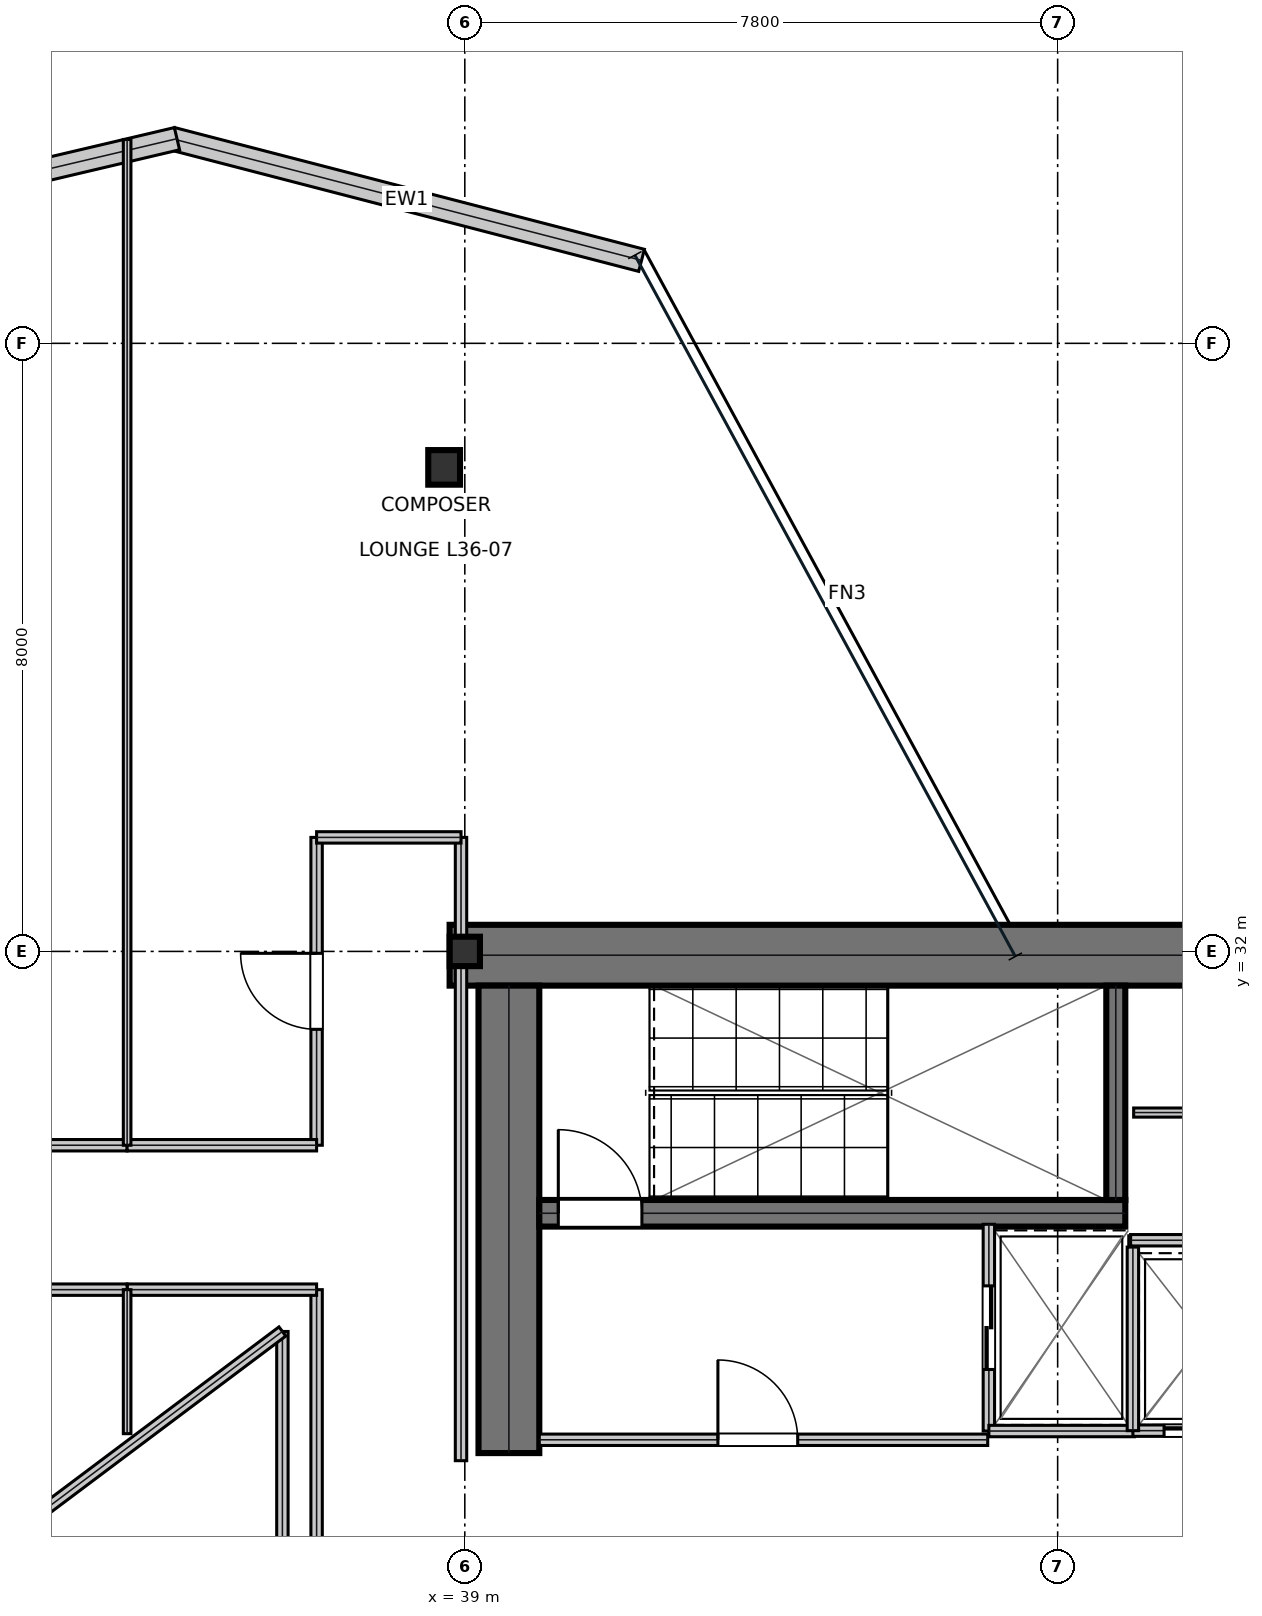
"""IFC4 building model, lengths in metres.
Left out: names, types, materials, properties, quantities, classifications, styles, units other than length and angle.
Written with IfcOpenShell. Run it as: python <this file> out.ifc"""

import sys

from ifc_helpers import new_model, si_unit, direction, frame, frame_2d, origin, origin_2d, place, context, subcontext, project, spatial, rectangle, i_section, extrude, element, fill, save


model = new_model("IFC4")
c1 = context("Model", 3, precision=1e-05, world=origin(), true_north=direction((0.0, 1.0)))
c2 = subcontext(c1, "Body", "Model", "MODEL_VIEW")
j1 = project(units=[si_unit("LENGTHUNIT", "METRE"), si_unit("PLANEANGLEUNIT", "RADIAN")], contexts=[c1])
p1 = place(None, origin())
s1 = spatial("IfcSite", under=j1, at=p1, CompositionType="ELEMENT")
p2 = place(p1, origin())
s2 = spatial("IfcBuilding", under=s1, at=p2, CompositionType="ELEMENT")
p3 = place(p2, frame((0.0, 0.0, 157.35)))
s3 = spatial("IfcBuildingStorey", under=s2, at=p3, CompositionType="ELEMENT", Elevation=157.35)
p4 = place(p3, frame((38.8, 31.95, 0.0), z_axis=(0.0, 0.0, 1.0), x_axis=(1.0, 0.0, 0.0)))
e1 = element("IfcWall", 1, at=p4, inside=s3, PredefinedType="SHEAR", context=c2, shape_type="SweptSolid", body=[
    extrude(rectangle(XDim=16.0, YDim=0.8, at=frame_2d((8.0, 0.0))), origin(), (0.0, 0.0, 1.0), 3.81),
])
p5 = place(p3, frame((39.58, 25.4, 0.0), z_axis=(0.0, 0.0, 1.0), x_axis=(0.0, 1.0, 0.0)))
e2 = element("IfcWall", 2, at=p5, inside=s3, PredefinedType="SHEAR", context=c2, shape_type="SweptSolid", body=[
    extrude(rectangle(XDim=6.15, YDim=0.8, at=frame_2d((3.075, 0.0))), origin(), (0.0, 0.0, 1.0), 3.81),
])
p6 = place(p3, frame((39.98, 28.555, 0.0), z_axis=(0.0, 0.0, 1.0), x_axis=(1.0, 0.0, 0.0)))
e3 = element("IfcWall", 3, at=p6, inside=s3, PredefinedType="SHEAR", context=c2, shape_type="SweptSolid", body=[
    extrude(rectangle(XDim=7.71, YDim=0.35, at=frame_2d((3.855, 0.0))), origin(), (0.0, 0.0, 1.0), 3.81),
])
p7 = place(p6, frame((0.25, 0.0, 0.0)))
e4 = element("IfcOpeningElement", 4, at=p7, cuts=e3, PredefinedType="OPENING", context=c2, shape_type="SweptSolid", body=[
    extrude(rectangle(XDim=1.1, YDim=2.15, at=frame_2d((0.55, 1.075))), frame((0.0, 0.185, 0.0), z_axis=(0.0, -1.0, 0.0), x_axis=(1.0, 0.0, 0.0)), (0.0, 0.0, 1.0), 0.37),
])
p8 = place(p3, frame((47.565, 28.73, 0.0), z_axis=(0.0, 0.0, 1.0), x_axis=(0.0, 1.0, 0.0)))
e5 = element("IfcWall", 5, at=p8, inside=s3, PredefinedType="SHEAR", context=c2, shape_type="SweptSolid", body=[
    extrude(rectangle(XDim=2.82, YDim=0.25, at=frame_2d((1.41, 0.0))), origin(), (0.0, 0.0, 1.0), 3.81),
])
p9 = place(p3, frame((39.0, 32.0, 0.0), z_axis=(0.0, 0.0, 1.0), x_axis=(1.0, 0.0, 0.0)))
e6 = element("IfcColumn", 6, at=p9, inside=s3, PredefinedType="COLUMN", context=c2, shape_type="SweptSolid", body=[
    extrude(i_section(OverallWidth=0.398, OverallDepth=0.387, WebThickness=0.021, FlangeThickness=0.033, at=origin_2d()), origin(), (0.0, 0.0, 1.0), 4.044),
])
p10 = place(p3, frame((38.728, 38.368, 0.016), z_axis=(-0.004494627579, -0.026846289054, 0.999629468897), x_axis=(0.986273042842, -0.165122636132, 0.0)))
e7 = element("IfcColumn", 7, at=p10, inside=s3, PredefinedType="COLUMN", context=c2, shape_type="SweptSolid", body=[
    extrude(i_section(OverallWidth=0.418, OverallDepth=0.455, WebThickness=0.042, FlangeThickness=0.068, at=origin_2d()), origin(), (0.0, 0.0, 1.0), 4.02),
])
p11 = place(p3, frame((41.325, 41.092, 0.0), z_axis=(0.0, 0.0, 1.0), x_axis=(-0.96801891639, 0.250877216005, 0.0)))
e8 = element("IfcWall", 8, at=p11, inside=s3, PredefinedType="STANDARD", context=c2, shape_type="SweptSolid", body=[
    extrude(rectangle(XDim=6.384, YDim=0.3, at=frame_2d((3.192, 0.0))), origin(), (0.0, 0.0, 1.0), 3.81),
])
p12 = place(p3, frame((35.213, 42.692, 0.0), z_axis=(0.0, 0.0, 1.0), x_axis=(-0.973355101444, -0.229302957882, 0.0)))
e9 = element("IfcWall", 9, at=p12, inside=s3, PredefinedType="STANDARD", context=c2, shape_type="SweptSolid", body=[
    extrude(rectangle(XDim=6.349, YDim=0.3, at=frame_2d((3.174, 0.0))), origin(), (0.0, 0.0, 1.0), 3.81),
])
p13 = place(p3, frame((39.98, 25.575, 0.0), z_axis=(0.0, 0.0, 1.0), x_axis=(1.0, 0.0, 0.0)))
e10 = element("IfcWall", 10, at=p13, inside=s3, PredefinedType="PARTITIONING", context=c2, shape_type="SweptSolid", body=[
    extrude(rectangle(XDim=5.9, YDim=0.15, at=frame_2d((2.95, 0.0))), origin(), (0.0, 0.0, 1.0), 3.81),
])
p14 = place(p13, frame((2.35, 0.0, 0.0)))
e11 = element("IfcOpeningElement", 11, at=p14, cuts=e10, PredefinedType="OPENING", context=c2, shape_type="SweptSolid", body=[
    extrude(rectangle(XDim=1.05, YDim=2.15, at=frame_2d((0.525, 1.075))), frame((0.0, 0.085, 0.0), z_axis=(0.0, -1.0, 0.0), x_axis=(1.0, 0.0, 0.0)), (0.0, 0.0, 1.0), 0.17),
])
p15 = place(p3, frame((45.895, 25.69, 0.0), z_axis=(0.0, 0.0, 1.0), x_axis=(0.0, 1.0, 0.0)))
e12 = element("IfcWall", 12, at=p15, inside=s3, PredefinedType="PARTITIONING", context=c2, shape_type="SweptSolid", body=[
    extrude(rectangle(XDim=2.72, YDim=0.15, at=frame_2d((1.36, 0.0))), origin(), (0.0, 0.0, 1.0), 3.81),
])
p16 = place(p15, frame((0.81, 0.0, 0.0)))
e13 = element("IfcOpeningElement", 13, at=p16, cuts=e12, PredefinedType="OPENING", context=c2, shape_type="SweptSolid", body=[
    extrude(rectangle(XDim=1.1, YDim=2.15, at=frame_2d((0.55, 1.075))), frame((0.0, 0.085, 0.0), z_axis=(0.0, -1.0, 0.0), x_axis=(1.0, 0.0, 0.0)), (0.0, 0.0, 1.0), 0.17),
])
p17 = place(p3, frame((45.895, 25.69, 0.0), z_axis=(0.0, 0.0, 1.0), x_axis=(1.0, 0.0, 0.0)))
e14 = element("IfcWall", 14, at=p17, inside=s3, PredefinedType="PARTITIONING", context=c2, shape_type="SweptSolid", body=[
    extrude(rectangle(XDim=1.915, YDim=0.15, at=frame_2d((0.958, 0.0))), origin(), (0.0, 0.0, 1.0), 3.81),
])
p18 = place(p3, frame((47.79, 25.695, 0.0), z_axis=(0.0, 0.0, 1.0), x_axis=(1.0, 0.0, 0.0)))
e15 = element("IfcWall", 15, at=p18, inside=s3, PredefinedType="PARTITIONING", context=c2, shape_type="SweptSolid", body=[
    extrude(rectangle(XDim=1.92, YDim=0.15, at=frame_2d((0.96, 0.0))), origin(), (0.0, 0.0, 1.0), 3.81),
])
p19 = place(p18, frame((0.41, 0.0, 0.0)))
e16 = element("IfcOpeningElement", 16, at=p19, cuts=e15, PredefinedType="OPENING", context=c2, shape_type="SweptSolid", body=[
    extrude(rectangle(XDim=1.1, YDim=2.15, at=frame_2d((0.55, 1.075))), frame((0.0, 0.085, 0.0), z_axis=(0.0, -1.0, 0.0), x_axis=(1.0, 0.0, 0.0)), (0.0, 0.0, 1.0), 0.17),
])
p20 = place(p3, frame((47.79, 25.695, 0.0), z_axis=(0.0, 0.0, 1.0), x_axis=(0.0, 1.0, 0.0)))
e17 = element("IfcWall", 17, at=p20, inside=s3, PredefinedType="PARTITIONING", context=c2, shape_type="SweptSolid", body=[
    extrude(rectangle(XDim=2.415, YDim=0.15, at=frame_2d((1.208, 0.0))), origin(), (0.0, 0.0, 1.0), 3.81),
])
p21 = place(p3, frame((47.76, 28.2, 0.0), z_axis=(0.0, 0.0, 1.0), x_axis=(1.0, 0.0, 0.0)))
e18 = element("IfcWall", 18, at=p21, inside=s3, PredefinedType="PARTITIONING", context=c2, shape_type="SweptSolid", body=[
    extrude(rectangle(XDim=1.99, YDim=0.15, at=frame_2d((0.995, 0.0))), origin(), (0.0, 0.0, 1.0), 3.81),
])
p22 = place(p3, frame((47.8, 29.88, 0.0), z_axis=(0.0, 0.0, 1.0), x_axis=(1.0, 0.0, 0.0)))
e19 = element("IfcWall", 19, at=p22, inside=s3, PredefinedType="PARTITIONING", context=c2, shape_type="SweptSolid", body=[
    extrude(rectangle(XDim=5.86, YDim=0.12, at=frame_2d((2.93, 0.0))), origin(), (0.0, 0.0, 1.0), 3.81),
])
p23 = place(p22, frame((2.5, 0.0, 0.0)))
e20 = element("IfcOpeningElement", 20, at=p23, cuts=e19, PredefinedType="OPENING", context=c2, shape_type="SweptSolid", body=[
    extrude(rectangle(XDim=0.85, YDim=2.15, at=frame_2d((0.425, 1.075))), frame((0.0, 0.07, 0.0), z_axis=(0.0, -1.0, 0.0), x_axis=(1.0, 0.0, 0.0)), (0.0, 0.0, 1.0), 0.14),
])
p24 = place(p3, frame((37.05, 14.5, 0.0), z_axis=(0.0, 0.0, 1.0), x_axis=(0.0, 1.0, 0.0)))
e21 = element("IfcWall", 21, at=p24, inside=s3, PredefinedType="PARTITIONING", context=c2, shape_type="SweptSolid", body=[
    extrude(rectangle(XDim=13.05, YDim=0.15, at=frame_2d((6.525, 0.0))), origin(), (0.0, 0.0, 1.0), 3.19),
])
p25 = place(p24, frame((4.585, 0.0, 0.0)))
e22 = element("IfcOpeningElement", 22, at=p25, cuts=e21, PredefinedType="OPENING", context=c2, shape_type="SweptSolid", body=[
    extrude(rectangle(XDim=1.0, YDim=2.15, at=frame_2d((0.5, 1.075))), frame((0.0, 0.085, 0.0), z_axis=(0.0, -1.0, 0.0), x_axis=(1.0, 0.0, 0.0)), (0.0, 0.0, 1.0), 0.17),
])
p26 = place(p3, frame((37.05, 29.45, 0.0), z_axis=(0.0, 0.0, 1.0), x_axis=(0.0, 1.0, 0.0)))
e23 = element("IfcWall", 23, at=p26, inside=s3, PredefinedType="PARTITIONING", context=c2, shape_type="SweptSolid", body=[
    extrude(rectangle(XDim=4.05, YDim=0.15, at=frame_2d((2.025, 0.0))), origin(), (0.0, 0.0, 1.0), 3.19),
])
p27 = place(p26, frame((1.525, 0.0, 0.0)))
e24 = element("IfcOpeningElement", 24, at=p27, cuts=e23, PredefinedType="OPENING", context=c2, shape_type="SweptSolid", body=[
    extrude(rectangle(XDim=1.0, YDim=2.15, at=frame_2d((0.5, 1.075))), frame((0.0, 0.085, 0.0), z_axis=(0.0, -1.0, 0.0), x_axis=(1.0, 0.0, 0.0)), (0.0, 0.0, 1.0), 0.17),
])
p28 = place(p3, frame((34.557, 27.55, 0.0), z_axis=(0.0, 0.0, 1.0), x_axis=(1.0, 0.0, 0.0)))
e25 = element("IfcWall", 25, at=p28, inside=s3, PredefinedType="PARTITIONING", context=c2, shape_type="SweptSolid", body=[
    extrude(rectangle(XDim=2.493, YDim=0.15, at=frame_2d((1.247, 0.0))), origin(), (0.0, 0.0, 1.0), 3.443),
])
for number, where, z_axis, x_axis in (
    (26, (29.4, 27.55, 0.0), (0.0, 0.0, 1.0), (1.0, 0.0, 0.0)),
    (27, (29.4, 29.45, 0.0), (0.0, 0.0, 1.0), (1.0, 0.0, 0.0)),
):
    element("IfcWall", number, at=place(p3, frame(where, z_axis=z_axis, x_axis=x_axis)), inside=s3, PredefinedType="PARTITIONING", context=c2, shape_type="SweptSolid", body=[
        extrude(rectangle(XDim=5.157, YDim=0.15, at=frame_2d((2.579, 0.0))), origin(), (0.0, 0.0, 1.0), 3.19),
    ])
p29 = place(p3, frame((38.95, 25.3, 0.0), z_axis=(0.0, 0.0, 1.0), x_axis=(0.0, 1.0, 0.0)))
e28 = element("IfcWall", 28, at=p29, inside=s3, PredefinedType="PARTITIONING", context=c2, shape_type="SweptSolid", body=[
    extrude(rectangle(XDim=8.2, YDim=0.15, at=frame_2d((4.1, 0.0))), origin(), (0.0, 0.0, 1.0), 3.19),
])
p30 = place(p3, frame((34.557, 29.45, 0.0), z_axis=(0.0, 0.0, 1.0), x_axis=(1.0, 0.0, 0.0)))
e29 = element("IfcWall", 29, at=p30, inside=s3, PredefinedType="PARTITIONING", context=c2, shape_type="SweptSolid", body=[
    extrude(rectangle(XDim=2.493, YDim=0.15, at=frame_2d((1.247, 0.0))), origin(), (0.0, 0.0, 1.0), 3.81),
])
p31 = place(p3, frame((37.05, 33.5, 0.0), z_axis=(0.0, 0.0, 1.0), x_axis=(1.0, 0.0, 0.0)))
e30 = element("IfcWall", 30, at=p31, inside=s3, PredefinedType="PARTITIONING", context=c2, shape_type="SweptSolid", body=[
    extrude(rectangle(XDim=1.9, YDim=0.15, at=frame_2d((0.95, 0.0))), origin(), (0.0, 0.0, 1.0), 3.19),
])
p32 = place(p3, frame((34.557, 25.655, 0.0), z_axis=(0.0, 0.0, 1.0), x_axis=(0.0, 1.0, 0.0)))
e31 = element("IfcWall", 31, at=p32, inside=s3, PredefinedType="PARTITIONING", context=c2, shape_type="SweptSolid", body=[
    extrude(rectangle(XDim=1.895, YDim=0.1, at=frame_2d((0.947, 0.0))), origin(), (0.0, 0.0, 1.0), 3.81),
])
p33 = place(p3, frame((34.557, 29.45, 0.0), z_axis=(0.0, 0.0, 1.0), x_axis=(0.0, 1.0, 0.0)))
e32 = element("IfcWall", 32, at=p33, inside=s3, PredefinedType="PARTITIONING", context=c2, shape_type="SweptSolid", body=[
    extrude(rectangle(XDim=13.232, YDim=0.1, at=frame_2d((6.616, 0.0))), origin(), (0.0, 0.0, 1.0), 3.19),
])
p34 = place(p3, frame((36.6, 21.0, 0.0), z_axis=(0.0, 0.0, 1.0), x_axis=(0.0, 1.0, 0.0)))
e33 = element("IfcWall", 33, at=p34, inside=s3, PredefinedType="MOVABLE", context=c2, shape_type="SweptSolid", body=[
    extrude(rectangle(XDim=6.0, YDim=0.15, at=frame_2d((3.0, 0.0))), origin(), (0.0, 0.0, 1.0), 3.81),
])
p35 = place(p3, frame((36.6, 27.0, 0.0), z_axis=(0.0, 0.0, 1.0), x_axis=(-0.8, -0.6, 0.0)))
e34 = element("IfcWall", 34, at=p35, inside=s3, PredefinedType="MOVABLE", context=c2, shape_type="SweptSolid", body=[
    extrude(rectangle(XDim=5.0, YDim=0.15, at=frame_2d((2.5, 0.0))), origin(), (0.0, 0.0, 1.0), 3.81),
])
p36 = place(p14, origin())
e35 = element("IfcDoor", 35, at=p36, inside=s3, OperationType="SINGLE_SWING_LEFT", PredefinedType="DOOR", context=c2, shape_type="SweptSolid", body=[
    extrude(rectangle(XDim=1.05, YDim=2.15, at=frame_2d((0.525, 1.075))), frame((0.0, 0.025, 0.0), z_axis=(0.0, -1.0, 0.0), x_axis=(1.0, 0.0, 0.0)), (0.0, 0.0, 1.0), 0.05),
])
fill(e11, e35)
p37 = place(p16, frame((1.1, 0.0, 0.0), z_axis=(0.0, 0.0, 1.0), x_axis=(-1.0, 0.0, 0.0)))
e36 = element("IfcDoor", 36, at=p37, inside=s3, OperationType="DOUBLE_DOOR_SLIDING", PredefinedType="DOOR", context=c2, shape_type="SweptSolid", body=[
    extrude(rectangle(XDim=1.1, YDim=2.15, at=frame_2d((0.55, 1.075))), frame((0.0, 0.025, 0.0), z_axis=(0.0, -1.0, 0.0), x_axis=(1.0, 0.0, 0.0)), (0.0, 0.0, 1.0), 0.05),
])
fill(e13, e36)
p38 = place(p19, frame((1.1, 0.0, 0.0), z_axis=(0.0, 0.0, 1.0), x_axis=(-1.0, 0.0, 0.0)))
e37 = element("IfcDoor", 37, at=p38, inside=s3, OperationType="DOUBLE_DOOR_SLIDING", PredefinedType="DOOR", context=c2, shape_type="SweptSolid", body=[
    extrude(rectangle(XDim=1.1, YDim=2.15, at=frame_2d((0.55, 1.075))), frame((0.0, 0.025, 0.0), z_axis=(0.0, -1.0, 0.0), x_axis=(1.0, 0.0, 0.0)), (0.0, 0.0, 1.0), 0.05),
])
fill(e16, e37)
p39 = place(p27, origin())
e38 = element("IfcDoor", 38, at=p39, inside=s3, OperationType="SINGLE_SWING_RIGHT", PredefinedType="DOOR", context=c2, shape_type="SweptSolid", body=[
    extrude(rectangle(XDim=1.0, YDim=2.15, at=frame_2d((0.5, 1.075))), frame((0.0, 0.025, 0.0), z_axis=(0.0, -1.0, 0.0), x_axis=(1.0, 0.0, 0.0)), (0.0, 0.0, 1.0), 0.05),
])
fill(e24, e38)
p40 = place(p7, origin())
e39 = element("IfcDoor", 39, at=p40, inside=s3, OperationType="SINGLE_SWING_LEFT", PredefinedType="DOOR", context=c2, shape_type="SweptSolid", body=[
    extrude(rectangle(XDim=1.1, YDim=2.15, at=frame_2d((0.55, 1.075))), frame((0.0, 0.025, 0.0), z_axis=(0.0, -1.0, 0.0), x_axis=(1.0, 0.0, 0.0)), (0.0, 0.0, 1.0), 0.05),
])
fill(e4, e39)
save(model, sys.argv[1])
